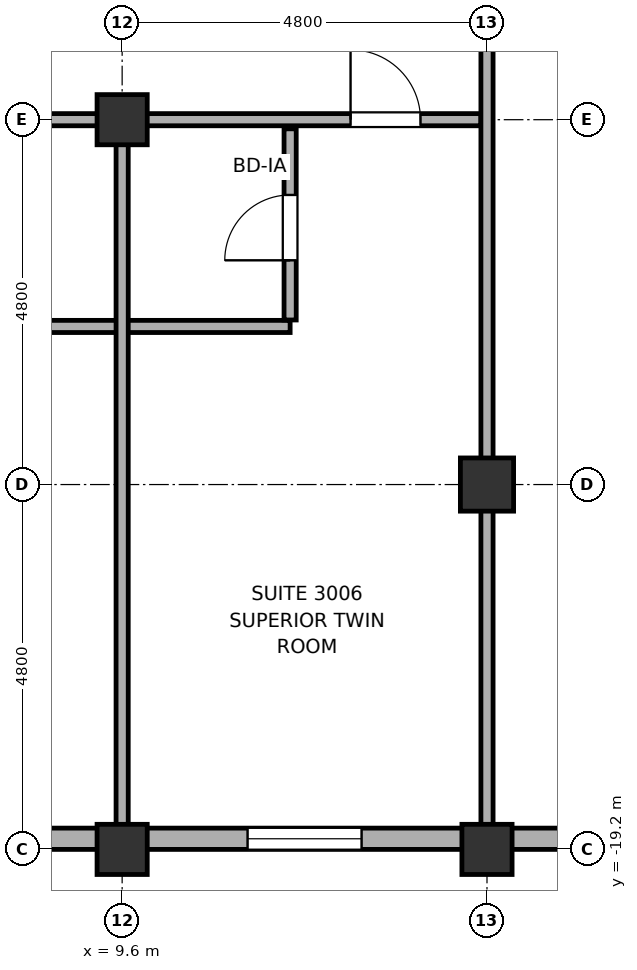
"""IFC4 building model, lengths in metres.
Left out: names, types, materials, properties, quantities, classifications, styles, units other than length and angle.
Written with IfcOpenShell. Run it as: python <this file> out.ifc"""

import sys

from ifc_helpers import new_model, si_unit, direction, frame, frame_2d, origin, origin_2d, place, context, subcontext, project, spatial, rectangle, hollow_rectangle, hollow_circle, extrude, element, fill, save


model = new_model("IFC4")
c1 = context("Model", 3, precision=1e-05, world=origin(), true_north=direction((0.0, 1.0)))
c2 = subcontext(c1, "Body", "Model", "MODEL_VIEW")
j1 = project(units=[si_unit("LENGTHUNIT", "METRE"), si_unit("PLANEANGLEUNIT", "RADIAN")], contexts=[c1])
p1 = place(None, origin())
s1 = spatial("IfcSite", under=j1, at=p1, CompositionType="ELEMENT")
p2 = place(p1, origin())
s2 = spatial("IfcBuilding", under=s1, at=p2, CompositionType="ELEMENT")
p3 = place(p2, frame((0.0, 0.0, 124.8)))
s3 = spatial("IfcBuildingStorey", under=s2, at=p3, CompositionType="ELEMENT", Elevation=124.8)
for number, where, z_axis, x_axis in (
    (1, (9.6, -19.2, 0.0), (0.0, 0.0, 1.0), (1.0, 0.0, 0.0)),
    (2, (9.6, -9.6, 0.0), (0.0, 0.0, 1.0), (1.0, 0.0, 0.0)),
    (3, (14.4, -19.2, 0.0), (0.0, 0.0, 1.0), (1.0, 0.0, 0.0)),
):
    element("IfcColumn", number, at=place(p3, frame(where, z_axis=z_axis, x_axis=x_axis)), inside=s3, PredefinedType="COLUMN", context=c2, shape_type="SweptSolid", body=[
        extrude(hollow_circle(Radius=0.33, WallThickness=0.028, at=origin_2d()), origin(), (0.0, 0.0, 1.0), 3.7),
    ])
p4 = place(p3, frame((14.4, -14.4, 0.0), z_axis=(0.0, 0.0, 1.0), x_axis=(1.0, 0.0, 0.0)))
e4 = element("IfcColumn", 4, at=p4, inside=s3, PredefinedType="COLUMN", context=c2, shape_type="SweptSolid", body=[
    extrude(hollow_rectangle(XDim=0.7, YDim=0.7, WallThickness=0.032, at=origin_2d()), origin(), (0.0, 0.0, 1.0), 3.7),
])
p5 = place(p3, frame((4.75, -19.06, 0.0), z_axis=(0.0, 0.0, 1.0), x_axis=(1.0, 0.0, 0.0)))
e5 = element("IfcWall", 5, at=p5, inside=s3, PredefinedType="SOLIDWALL", context=c2, shape_type="SweptSolid", body=[
    extrude(rectangle(XDim=20.45, YDim=0.28, at=frame_2d((10.225, 0.0))), origin(), (0.0, 0.0, 1.0), 2.12),
])
p6 = place(p5, frame((11.817, 0.0, 0.75)))
e6 = element("IfcOpeningElement", 6, at=p6, cuts=e5, PredefinedType="OPENING", context=c2, shape_type="SweptSolid", body=[
    extrude(rectangle(XDim=1.5, YDim=1.15, at=frame_2d((0.75, 0.575))), frame((0.0, 0.155, 0.0), z_axis=(0.0, -1.0, 0.0), x_axis=(1.0, 0.0, 0.0)), (0.0, 0.0, 1.0), 0.31),
])
p7 = place(p5, frame((1.7, 0.0, 0.75)))
e7 = element("IfcOpeningElement", 7, at=p7, cuts=e5, PredefinedType="OPENING", context=c2, shape_type="SweptSolid", body=[
    extrude(rectangle(XDim=1.5, YDim=1.15, at=frame_2d((0.75, 0.575))), frame((0.0, 0.155, 0.0), z_axis=(0.0, -1.0, 0.0), x_axis=(1.0, 0.0, 0.0)), (0.0, 0.0, 1.0), 0.31),
])
p8 = place(p5, frame((6.5, 0.0, 0.75)))
e8 = element("IfcOpeningElement", 8, at=p8, cuts=e5, PredefinedType="OPENING", context=c2, shape_type="SweptSolid", body=[
    extrude(rectangle(XDim=1.5, YDim=1.15, at=frame_2d((0.75, 0.575))), frame((0.0, 0.155, 0.0), z_axis=(0.0, -1.0, 0.0), x_axis=(1.0, 0.0, 0.0)), (0.0, 0.0, 1.0), 0.31),
])
p9 = place(p3, frame((7.39, -12.32, 0.0), z_axis=(0.0, 0.0, 1.0), x_axis=(1.0, 0.0, 0.0)))
e9 = element("IfcWall", 9, at=p9, inside=s3, PredefinedType="PARTITIONING", context=c2, shape_type="SweptSolid", body=[
    extrude(rectangle(XDim=4.42, YDim=0.16, at=frame_2d((2.21, 0.0))), origin(), (0.0, 0.0, 1.0), 3.12),
])
p10 = place(p3, frame((-14.32, -9.6, 0.0), z_axis=(0.0, 0.0, 1.0), x_axis=(1.0, 0.0, 0.0)))
e10 = element("IfcWall", 10, at=p10, inside=s3, PredefinedType="PARTITIONING", context=c2, shape_type="SweptSolid", body=[
    extrude(rectangle(XDim=28.64, YDim=0.16, at=frame_2d((14.32, 0.0))), origin(), (0.0, 0.0, 1.0), 2.12),
])
p11 = place(p10, frame((0.795, 0.0, 0.0)))
e11 = element("IfcOpeningElement", 11, at=p11, cuts=e10, PredefinedType="OPENING", context=c2, shape_type="SweptSolid", body=[
    extrude(rectangle(XDim=0.92, YDim=2.02, at=frame_2d((0.46, 1.01))), frame((0.0, 0.095, 0.0), z_axis=(0.0, -1.0, 0.0), x_axis=(1.0, 0.0, 0.0)), (0.0, 0.0, 1.0), 0.19),
])
p12 = place(p10, frame((7.725, 0.0, 0.0)))
e12 = element("IfcOpeningElement", 12, at=p12, cuts=e10, PredefinedType="OPENING", context=c2, shape_type="SweptSolid", body=[
    extrude(rectangle(XDim=0.92, YDim=2.02, at=frame_2d((0.46, 1.01))), frame((0.0, 0.095, 0.0), z_axis=(0.0, -1.0, 0.0), x_axis=(1.0, 0.0, 0.0)), (0.0, 0.0, 1.0), 0.19),
])
p13 = place(p10, frame((10.395, 0.0, 0.0)))
e13 = element("IfcOpeningElement", 13, at=p13, cuts=e10, PredefinedType="OPENING", context=c2, shape_type="SweptSolid", body=[
    extrude(rectangle(XDim=0.92, YDim=2.02, at=frame_2d((0.46, 1.01))), frame((0.0, 0.095, 0.0), z_axis=(0.0, -1.0, 0.0), x_axis=(1.0, 0.0, 0.0)), (0.0, 0.0, 1.0), 0.19),
])
p14 = place(p10, frame((17.325, 0.0, 0.0)))
e14 = element("IfcOpeningElement", 14, at=p14, cuts=e10, PredefinedType="OPENING", context=c2, shape_type="SweptSolid", body=[
    extrude(rectangle(XDim=0.92, YDim=2.02, at=frame_2d((0.46, 1.01))), frame((0.0, 0.095, 0.0), z_axis=(0.0, -1.0, 0.0), x_axis=(1.0, 0.0, 0.0)), (0.0, 0.0, 1.0), 0.19),
])
p15 = place(p10, frame((19.995, 0.0, 0.0)))
e15 = element("IfcOpeningElement", 15, at=p15, cuts=e10, PredefinedType="OPENING", context=c2, shape_type="SweptSolid", body=[
    extrude(rectangle(XDim=0.92, YDim=2.02, at=frame_2d((0.46, 1.01))), frame((0.0, 0.095, 0.0), z_axis=(0.0, -1.0, 0.0), x_axis=(1.0, 0.0, 0.0)), (0.0, 0.0, 1.0), 0.19),
])
p16 = place(p10, frame((26.925, 0.0, 0.0)))
e16 = element("IfcOpeningElement", 16, at=p16, cuts=e10, PredefinedType="OPENING", context=c2, shape_type="SweptSolid", body=[
    extrude(rectangle(XDim=0.92, YDim=2.02, at=frame_2d((0.46, 1.01))), frame((0.0, 0.095, 0.0), z_axis=(0.0, -1.0, 0.0), x_axis=(1.0, 0.0, 0.0)), (0.0, 0.0, 1.0), 0.19),
])
p17 = place(p3, frame((9.6, -18.91, 0.0), z_axis=(0.0, 0.0, 1.0), x_axis=(0.0, 1.0, 0.0)))
e17 = element("IfcWall", 17, at=p17, inside=s3, PredefinedType="PARTITIONING", context=c2, shape_type="SweptSolid", body=[
    extrude(rectangle(XDim=9.19, YDim=0.16, at=frame_2d((4.595, 0.0))), origin(), (0.0, 0.0, 1.0), 2.12),
])
p18 = place(p3, frame((11.81, -12.235, 0.0), z_axis=(0.0, 0.0, 1.0), x_axis=(0.0, 1.0, 0.0)))
e18 = element("IfcWall", 18, at=p18, inside=s3, PredefinedType="PARTITIONING", context=c2, shape_type="SweptSolid", body=[
    extrude(rectangle(XDim=2.515, YDim=0.16, at=frame_2d((1.258, 0.0))), origin(), (0.0, 0.0, 1.0), 2.12),
])
p19 = place(p18, frame((0.785, 0.0, 0.0)))
e19 = element("IfcOpeningElement", 19, at=p19, cuts=e18, PredefinedType="OPENING", context=c2, shape_type="SweptSolid", body=[
    extrude(rectangle(XDim=0.86, YDim=2.02, at=frame_2d((0.43, 1.01))), frame((0.0, 0.095, 0.0), z_axis=(0.0, -1.0, 0.0), x_axis=(1.0, 0.0, 0.0)), (0.0, 0.0, 1.0), 0.19),
])
p20 = place(p3, frame((14.4, -18.91, 0.0), z_axis=(0.0, 0.0, 1.0), x_axis=(0.0, 1.0, 0.0)))
e20 = element("IfcWall", 20, at=p20, inside=s3, PredefinedType="PARTITIONING", context=c2, shape_type="SweptSolid", body=[
    extrude(rectangle(XDim=11.67, YDim=0.16, at=frame_2d((5.835, 0.0))), origin(), (0.0, 0.0, 1.0), 2.12),
])
p21 = place(p8, origin())
e21 = element("IfcWindow", 21, at=p21, inside=s3, PartitioningType="SINGLE_PANEL", PredefinedType="WINDOW", context=c2, shape_type="SweptSolid", body=[
    extrude(rectangle(XDim=1.5, YDim=1.15, at=frame_2d((0.75, 0.575))), frame((0.0, 0.03, 0.0), z_axis=(0.0, -1.0, 0.0), x_axis=(1.0, 0.0, 0.0)), (0.0, 0.0, 1.0), 0.06),
])
fill(e8, e21)
p22 = place(p16, origin())
e22 = element("IfcDoor", 22, at=p22, inside=s3, OperationType="SINGLE_SWING_LEFT", PredefinedType="DOOR", context=c2, shape_type="SweptSolid", body=[
    extrude(rectangle(XDim=0.92, YDim=2.02, at=frame_2d((0.46, 1.01))), frame((0.0, 0.025, 0.0), z_axis=(0.0, -1.0, 0.0), x_axis=(1.0, 0.0, 0.0)), (0.0, 0.0, 1.0), 0.05),
])
fill(e16, e22)
p23 = place(p19, origin())
e23 = element("IfcDoor", 23, at=p23, inside=s3, OperationType="SINGLE_SWING_LEFT", PredefinedType="DOOR", context=c2, shape_type="SweptSolid", body=[
    extrude(rectangle(XDim=0.86, YDim=2.02, at=frame_2d((0.43, 1.01))), frame((0.0, 0.025, 0.0), z_axis=(0.0, -1.0, 0.0), x_axis=(1.0, 0.0, 0.0)), (0.0, 0.0, 1.0), 0.05),
])
fill(e19, e23)
save(model, sys.argv[1])
